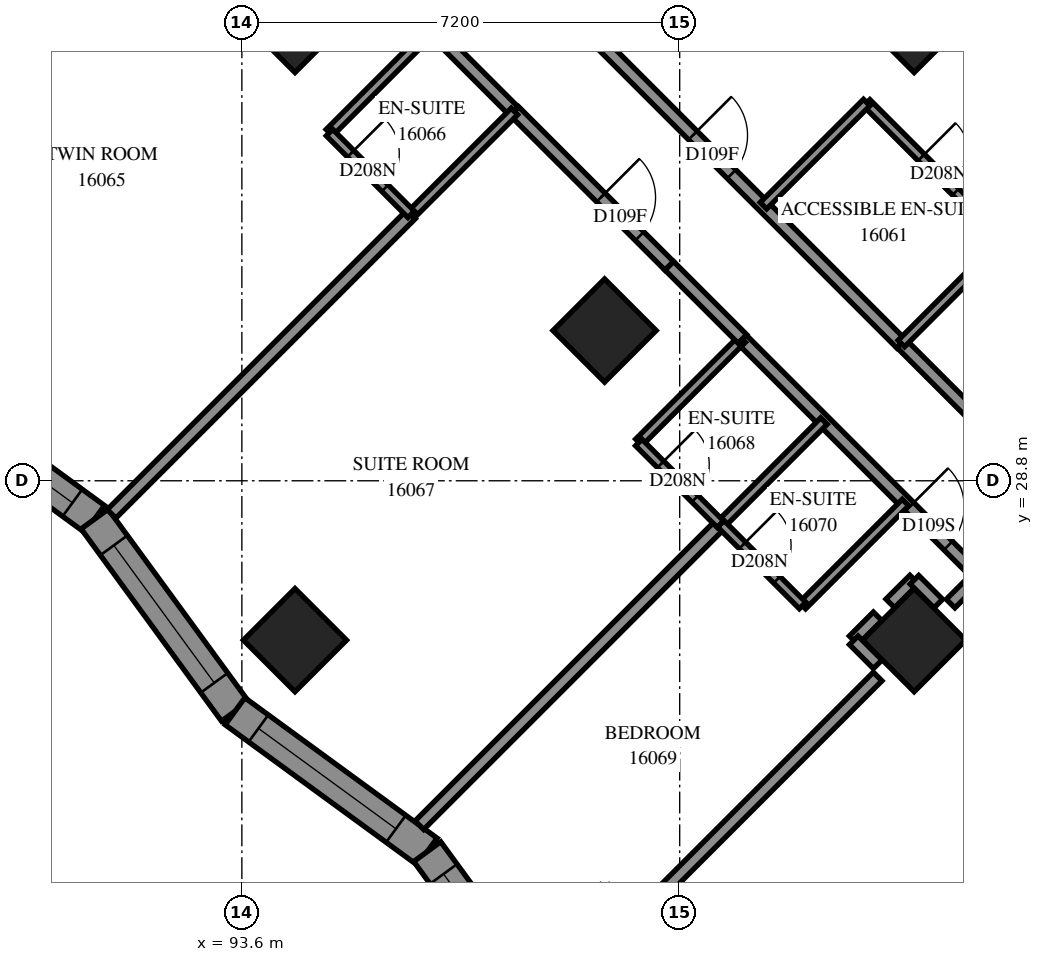
"""IFC4 building model, lengths in metres.
Left out: names, types, materials, properties, quantities, classifications, styles, units other than length and angle.
Written with IfcOpenShell. Run it as: python <this file> out.ifc"""

import sys

from ifc_helpers import new_model, si_unit, direction, frame, frame_2d, origin, origin_2d, place, context, subcontext, project, spatial, polyline, rectangle, outline, extrude, element, fill, save


model = new_model("IFC4")
c1 = context("Model", 3, precision=1e-05, world=origin(), true_north=direction((0.0, 1.0)))
c2 = subcontext(c1, "Body", "Model", "MODEL_VIEW")
j1 = project(units=[si_unit("LENGTHUNIT", "METRE"), si_unit("PLANEANGLEUNIT", "RADIAN")], contexts=[c1])
p1 = place(None, origin())
s1 = spatial("IfcSite", under=j1, at=p1, CompositionType="ELEMENT")
p2 = place(p1, origin())
s2 = spatial("IfcBuilding", under=s1, at=p2, CompositionType="ELEMENT")
p3 = place(p2, frame((0.0, 0.0, 61.0)))
s3 = spatial("IfcBuildingStorey", under=s2, at=p3, CompositionType="ELEMENT", Elevation=61.0)
for number, where, z_axis, x_axis in (
    (1, (94.474, 36.362, 0.0), (0.0, 0.0, 1.0), (0.707, -0.707, 0.0)),
    (2, (104.656, 36.362, 0.0), (0.0, 0.0, 1.0), (0.707, -0.707, 0.0)),
    (3, (99.565, 31.271, 0.0), (0.0, 0.0, 1.0), (0.707, -0.707, 0.0)),
    (4, (94.474, 26.18, 0.0), (0.0, 0.0, 1.0), (0.707, -0.707, 0.0)),
    (5, (104.656, 26.18, 0.0), (0.0, 0.0, 1.0), (0.707, -0.707, 0.0)),
):
    element("IfcColumn", number, at=place(p3, frame(where, z_axis=z_axis, x_axis=x_axis)), inside=s3, PredefinedType="COLUMN", context=c2, shape_type="SweptSolid", body=[
        extrude(rectangle(XDim=1.2, YDim=1.2, at=origin_2d()), origin(), (0.0, 0.0, 1.0), 3.1),
    ])
p4 = place(p3, frame((88.018, 30.479, 0.0), z_axis=(0.0, 0.0, 1.0), x_axis=(0.8076021815, -0.589727663, 0.0)))
e6 = element("IfcWall", 6, at=p4, inside=s3, PredefinedType="SOLIDWALL", context=c2, shape_type="SweptSolid", body=[
    extrude(outline(polyline([(-0.043, -0.275), (3.871, -0.275), (3.957, 0.275), (0.043, 0.275), (-0.043, -0.275)])), origin(), (0.0, 0.0, 1.0), 3.1),
])
p5 = place(p4, frame((0.662, 0.0, 0.5)))
e7 = element("IfcOpeningElement", 7, at=p5, cuts=e6, PredefinedType="OPENING", context=c2, shape_type="SweptSolid", body=[
    extrude(rectangle(XDim=2.8, YDim=2.45, at=frame_2d((1.4, 1.225))), frame((0.0, 0.285, 0.0), z_axis=(0.0, -1.0, 0.0), x_axis=(1.0, 0.0, 0.0)), (0.0, 0.0, 1.0), 0.57),
])
p6 = place(p3, frame((91.179, 28.171, 0.0), z_axis=(0.0, 0.0, 1.0), x_axis=(0.5897321582, -0.807598899, 0.0)))
e8 = element("IfcWall", 8, at=p6, inside=s3, PredefinedType="SOLIDWALL", context=c2, shape_type="SweptSolid", body=[
    extrude(outline(polyline([(0.043, -0.275), (3.957, -0.275), (3.871, 0.275), (-0.043, 0.275), (0.043, -0.275)])), origin(), (0.0, 0.0, 1.0), 3.1),
])
p7 = place(p6, frame((0.536, 0.0, 0.5)))
e9 = element("IfcOpeningElement", 9, at=p7, cuts=e8, PredefinedType="OPENING", context=c2, shape_type="SweptSolid", body=[
    extrude(rectangle(XDim=2.8, YDim=2.45, at=frame_2d((1.4, 1.225))), frame((0.0, 0.285, 0.0), z_axis=(0.0, -1.0, 0.0), x_axis=(1.0, 0.0, 0.0)), (0.0, 0.0, 1.0), 0.57),
])
p8 = place(p3, frame((93.487, 25.009, 0.0), z_axis=(0.0, 0.0, 1.0), x_axis=(0.8076021815, -0.589727663, 0.0)))
e10 = element("IfcWall", 10, at=p8, inside=s3, PredefinedType="SOLIDWALL", context=c2, shape_type="SweptSolid", body=[
    extrude(outline(polyline([(-0.043, -0.275), (3.871, -0.275), (3.957, 0.275), (0.043, 0.275), (-0.043, -0.275)])), origin(), (0.0, 0.0, 1.0), 3.1),
])
p9 = place(p8, frame((0.477, 0.0, 0.5)))
e11 = element("IfcOpeningElement", 11, at=p9, cuts=e10, PredefinedType="OPENING", context=c2, shape_type="SweptSolid", body=[
    extrude(rectangle(XDim=2.8, YDim=2.45, at=frame_2d((1.4, 1.225))), frame((0.0, 0.285, 0.0), z_axis=(0.0, -1.0, 0.0), x_axis=(1.0, 0.0, 0.0)), (0.0, 0.0, 1.0), 0.57),
])
p10 = place(p3, frame((96.648, 22.701, 0.0), z_axis=(0.0, 0.0, 1.0), x_axis=(0.5897321582, -0.807598899, 0.0)))
e12 = element("IfcWall", 12, at=p10, inside=s3, PredefinedType="SOLIDWALL", context=c2, shape_type="SweptSolid", body=[
    extrude(outline(polyline([(0.043, -0.275), (3.957, -0.275), (3.871, 0.275), (-0.043, 0.275), (0.043, -0.275)])), origin(), (0.0, 0.0, 1.0), 3.1),
])
p11 = place(p10, frame((0.455, 0.0, 0.7)))
e13 = element("IfcOpeningElement", 13, at=p11, cuts=e12, PredefinedType="OPENING", context=c2, shape_type="SweptSolid", body=[
    extrude(rectangle(XDim=1.8, YDim=2.2, at=frame_2d((0.9, 1.1))), frame((0.0, 0.285, 0.0), z_axis=(0.0, -1.0, 0.0), x_axis=(1.0, 0.0, 0.0)), (0.0, 0.0, 1.0), 0.57),
])
p12 = place(p3, frame((101.825, 31.125, 0.0), z_axis=(0.0, 0.0, 1.0), x_axis=(0.7071067812, -0.7071067812, 0.0)))
e14 = element("IfcWall", 14, at=p12, inside=s3, PredefinedType="PARTITIONING", context=c2, shape_type="SweptSolid", body=[
    extrude(rectangle(XDim=12.7, YDim=0.2, at=frame_2d((6.35, 0.0))), origin(), (0.0, 0.0, 1.0), 3.1),
])
p13 = place(p12, frame((3.895, 0.0, 0.0)))
e15 = element("IfcOpeningElement", 15, at=p13, cuts=e14, PredefinedType="OPENING", context=c2, shape_type="SweptSolid", body=[
    extrude(rectangle(XDim=0.9, YDim=2.1, at=frame_2d((0.45, 1.05))), frame((0.0, 0.11, 0.0), z_axis=(0.0, -1.0, 0.0), x_axis=(1.0, 0.0, 0.0)), (0.0, 0.0, 1.0), 0.22),
])
p14 = place(p12, frame((9.056, 0.0, 0.0)))
e16 = element("IfcOpeningElement", 16, at=p14, cuts=e14, PredefinedType="OPENING", context=c2, shape_type="SweptSolid", body=[
    extrude(rectangle(XDim=1.0, YDim=2.1, at=frame_2d((0.5, 1.05))), frame((0.0, 0.11, 0.0), z_axis=(0.0, -1.0, 0.0), x_axis=(1.0, 0.0, 0.0)), (0.0, 0.0, 1.0), 0.22),
])
p15 = place(p3, frame((86.311, 33.282, 0.0), z_axis=(0.0, 0.0, 1.0), x_axis=(0.7069956462, 0.7072178987, 0.0)))
e17 = element("IfcWall", 17, at=p15, inside=s3, PredefinedType="PARTITIONING", context=c2, shape_type="SweptSolid", body=[
    extrude(rectangle(XDim=9.449, YDim=0.2, at=frame_2d((4.724, 0.0))), origin(), (0.0, 0.0, 1.0), 3.1),
])
p16 = place(p3, frame((92.349, 40.601, 0.0), z_axis=(0.0, 0.0, 1.0), x_axis=(0.7071067812, -0.7071067812, 0.0)))
e18 = element("IfcWall", 18, at=p16, inside=s3, PredefinedType="PARTITIONING", context=c2, shape_type="SweptSolid", body=[
    extrude(rectangle(XDim=8.101, YDim=0.2, at=frame_2d((4.05, 0.0))), origin(), (0.0, 0.0, 1.0), 3.1),
])
p17 = place(p16, frame((2.909, 0.0, 0.0)))
e19 = element("IfcOpeningElement", 19, at=p17, cuts=e18, PredefinedType="OPENING", context=c2, shape_type="SweptSolid", body=[
    extrude(rectangle(XDim=0.9, YDim=2.1, at=frame_2d((0.45, 1.05))), frame((0.0, 0.11, 0.0), z_axis=(0.0, -1.0, 0.0), x_axis=(1.0, 0.0, 0.0)), (0.0, 0.0, 1.0), 0.22),
])
p18 = place(p3, frame((86.836, 35.372, 0.0), z_axis=(0.0, 0.0, 1.0), x_axis=(0.7071067812, 0.7071067812, 0.0)))
e20 = element("IfcWall", 20, at=p18, inside=s3, PredefinedType="PARTITIONING", context=c2, shape_type="SweptSolid", body=[
    extrude(rectangle(XDim=7.6, YDim=0.2, at=frame_2d((3.8, 0.0))), origin(), (0.0, 0.0, 1.0), 3.1),
])
p19 = place(p18, frame((6.342, 0.0, 0.0)))
e21 = element("IfcOpeningElement", 21, at=p19, cuts=e20, PredefinedType="OPENING", context=c2, shape_type="SweptSolid", body=[
    extrude(rectangle(XDim=1.0, YDim=2.1, at=frame_2d((0.5, 1.05))), frame((0.0, 0.11, 0.0), z_axis=(0.0, -1.0, 0.0), x_axis=(1.0, 0.0, 0.0)), (0.0, 0.0, 1.0), 0.22),
])
p20 = place(p3, frame((99.349, 36.147, 0.0), z_axis=(0.0, 0.0, 1.0), x_axis=(0.7071067812, -0.7071067812, 0.0)))
e22 = element("IfcWall", 22, at=p20, inside=s3, PredefinedType="PARTITIONING", context=c2, shape_type="SweptSolid", body=[
    extrude(rectangle(XDim=7.201, YDim=0.2, at=frame_2d((3.601, 0.0))), origin(), (0.0, 0.0, 1.0), 3.1),
])
p21 = place(p20, frame((2.358, 0.0, 0.0)))
e23 = element("IfcOpeningElement", 23, at=p21, cuts=e22, PredefinedType="OPENING", context=c2, shape_type="SweptSolid", body=[
    extrude(rectangle(XDim=0.9, YDim=2.1, at=frame_2d((0.45, 1.05))), frame((0.0, 0.11, 0.0), z_axis=(0.0, -1.0, 0.0), x_axis=(1.0, 0.0, 0.0)), (0.0, 0.0, 1.0), 0.22),
])
p22 = place(p3, frame((96.519, 23.136, 0.0), z_axis=(0.0, 0.0, 1.0), x_axis=(0.7071067812, 0.7071067812, 0.0)))
e24 = element("IfcWall", 24, at=p22, inside=s3, PredefinedType="PARTITIONING", context=c2, shape_type="SweptSolid", body=[
    extrude(rectangle(XDim=7.005, YDim=0.2, at=frame_2d((3.503, 0.0))), origin(), (0.0, 0.0, 1.0), 3.1),
])
p23 = place(p3, frame((91.457, 28.256, 0.0), z_axis=(0.0, 0.0, 1.0), x_axis=(0.7071067812, 0.7071067812, 0.0)))
e25 = element("IfcWall", 25, at=p23, inside=s3, PredefinedType="PARTITIONING", context=c2, shape_type="SweptSolid", body=[
    extrude(rectangle(XDim=6.964, YDim=0.2, at=frame_2d((3.482, 0.0))), origin(), (0.0, 0.0, 1.0), 3.1),
])
p24 = place(p3, frame((100.163, 21.689, 0.0), z_axis=(0.0, 0.0, 1.0), x_axis=(0.7071067812, 0.7071067812, 0.0)))
e26 = element("IfcWall", 26, at=p24, inside=s3, PredefinedType="PARTITIONING", context=c2, shape_type="SweptSolid", body=[
    extrude(rectangle(XDim=5.504, YDim=0.2, at=frame_2d((2.752, 0.0))), origin(), (0.0, 0.0, 1.0), 3.1),
])
p25 = place(p3, frame((98.082, 34.879, 0.0), z_axis=(0.0, 0.0, 1.0), x_axis=(0.7073845681, -0.7068288851, 0.0)))
e27 = element("IfcWall", 27, at=p25, inside=s3, PredefinedType="PARTITIONING", context=c2, shape_type="SweptSolid", body=[
    extrude(rectangle(XDim=3.599, YDim=0.2, at=frame_2d((1.8, 0.0))), origin(), (0.0, 0.0, 1.0), 3.1),
])
p26 = place(p25, frame((2.009, 0.0, 0.0)))
e28 = element("IfcOpeningElement", 28, at=p26, cuts=e27, PredefinedType="OPENING", context=c2, shape_type="SweptSolid", body=[
    extrude(rectangle(XDim=0.9, YDim=2.1, at=frame_2d((0.45, 1.05))), frame((0.0, 0.11, 0.0), z_axis=(0.0, -1.0, 0.0), x_axis=(1.0, 0.0, 0.0)), (0.0, 0.0, 1.0), 0.22),
])
p27 = place(p3, frame((103.875, 35.015, 0.0), z_axis=(0.0, 0.0, 1.0), x_axis=(0.7071067812, -0.7071067812, 0.0)))
e29 = element("IfcWall", 29, at=p27, inside=s3, PredefinedType="PARTITIONING", context=c2, shape_type="SweptSolid", body=[
    extrude(rectangle(XDim=3.199, YDim=0.15, at=frame_2d((1.599, 0.0))), origin(), (0.0, 0.0, 1.0), 3.1),
])
p28 = place(p27, frame((1.27, 0.0, 0.0)))
e30 = element("IfcOpeningElement", 30, at=p28, cuts=e29, PredefinedType="OPENING", context=c2, shape_type="SweptSolid", body=[
    extrude(rectangle(XDim=0.8, YDim=2.1, at=frame_2d((0.4, 1.05))), frame((0.0, 0.085, 0.0), z_axis=(0.0, -1.0, 0.0), x_axis=(1.0, 0.0, 0.0)), (0.0, 0.0, 1.0), 0.17),
])
p29 = place(p3, frame((104.445, 31.059, 0.0), z_axis=(0.0, 0.0, 1.0), x_axis=(0.7074545101, -0.7067588812, 0.0)))
e31 = element("IfcWall", 31, at=p29, inside=s3, PredefinedType="PARTITIONING", context=c2, shape_type="SweptSolid", body=[
    extrude(rectangle(XDim=2.875, YDim=0.2, at=frame_2d((1.438, 0.0))), origin(), (0.0, 0.0, 1.0), 3.1),
])
p30 = place(p29, frame((1.626, 0.0, 0.0)))
e32 = element("IfcOpeningElement", 32, at=p30, cuts=e31, PredefinedType="OPENING", context=c2, shape_type="SweptSolid", body=[
    extrude(rectangle(XDim=0.9, YDim=2.1, at=frame_2d((0.45, 1.05))), frame((0.0, 0.11, 0.0), z_axis=(0.0, -1.0, 0.0), x_axis=(1.0, 0.0, 0.0)), (0.0, 0.0, 1.0), 0.22),
])
p31 = place(p3, frame((100.129, 29.433, 0.0), z_axis=(0.0, 0.0, 1.0), x_axis=(0.7071067812, 0.7071067812, 0.0)))
e33 = element("IfcWall", 33, at=p31, inside=s3, PredefinedType="PARTITIONING", context=c2, shape_type="SweptSolid", body=[
    extrude(rectangle(XDim=2.401, YDim=0.15, at=frame_2d((1.201, 0.0))), origin(), (0.0, 0.0, 1.0), 3.1),
])
for number, where, z_axis, x_axis in (
    (34, (96.384, 33.178, 0.0), (0.0, 0.0, 1.0), (0.708, 0.707, 0.0)),
    (35, (104.445, 31.057, 0.0), (0.0, 0.0, 1.0), (0.707, 0.708, 0.0)),
    (36, (101.477, 28.085, 0.0), (0.0, 0.0, 1.0), (0.707, 0.708, 0.0)),
    (37, (102.177, 33.325, 0.0), (0.0, 0.0, 1.0), (0.708, 0.707, 0.0)),
):
    element("IfcWall", number, at=place(p3, frame(where, z_axis=z_axis, x_axis=x_axis)), inside=s3, PredefinedType="PARTITIONING", context=c2, shape_type="SweptSolid", body=[
        extrude(rectangle(XDim=2.4, YDim=0.15, at=frame_2d((1.2, 0.0))), origin(), (0.0, 0.0, 1.0), 3.1),
    ])
for number, where, z_axis, x_axis in (
    (38, (95.039, 34.525, 0.0), (0.0, 0.0, 1.0), (0.707, 0.707, 0.0)),
    (39, (102.817, 26.747, 0.0), (0.0, 0.0, 1.0), (0.707, 0.707, 0.0)),
):
    element("IfcWall", number, at=place(p3, frame(where, z_axis=z_axis, x_axis=x_axis)), inside=s3, PredefinedType="PARTITIONING", context=c2, shape_type="SweptSolid", body=[
        extrude(rectangle(XDim=2.398, YDim=0.15, at=frame_2d((1.199, 0.0))), origin(), (0.0, 0.0, 1.0), 3.1),
    ])
p32 = place(p3, frame((100.127, 29.429, 0.0), z_axis=(0.0, 0.0, 1.0), x_axis=(0.7071067812, -0.7071067812, 0.0)))
e40 = element("IfcWall", 40, at=p32, inside=s3, PredefinedType="PARTITIONING", context=c2, shape_type="SweptSolid", body=[
    extrude(rectangle(XDim=1.901, YDim=0.15, at=frame_2d((0.95, 0.0))), origin(), (0.0, 0.0, 1.0), 3.1),
])
p33 = place(p32, frame((0.508, 0.0, 0.0)))
e41 = element("IfcOpeningElement", 41, at=p33, cuts=e40, PredefinedType="OPENING", context=c2, shape_type="SweptSolid", body=[
    extrude(rectangle(XDim=0.8, YDim=2.1, at=frame_2d((0.4, 1.05))), frame((0.0, 0.085, 0.0), z_axis=(0.0, -1.0, 0.0), x_axis=(1.0, 0.0, 0.0)), (0.0, 0.0, 1.0), 0.17),
])
p34 = place(p3, frame((95.042, 34.526, 0.0), z_axis=(0.0, 0.0, 1.0), x_axis=(0.7065800724, -0.7076330979, 0.0)))
e42 = element("IfcWall", 42, at=p34, inside=s3, PredefinedType="PARTITIONING", context=c2, shape_type="SweptSolid", body=[
    extrude(rectangle(XDim=1.899, YDim=0.15, at=frame_2d((0.95, 0.0))), origin(), (0.0, 0.0, 1.0), 3.1),
])
p35 = place(p34, frame((0.491, 0.0, 0.0)))
e43 = element("IfcOpeningElement", 43, at=p35, cuts=e42, PredefinedType="OPENING", context=c2, shape_type="SweptSolid", body=[
    extrude(rectangle(XDim=0.8, YDim=2.1, at=frame_2d((0.4, 1.05))), frame((0.0, 0.085, 0.0), z_axis=(0.0, -1.0, 0.0), x_axis=(1.0, 0.0, 0.0)), (0.0, 0.0, 1.0), 0.17),
])
p36 = place(p3, frame((101.477, 28.091, 0.0), z_axis=(0.0, 0.0, 1.0), x_axis=(0.7076330979, -0.7065800724, 0.0)))
e44 = element("IfcWall", 44, at=p36, inside=s3, PredefinedType="PARTITIONING", context=c2, shape_type="SweptSolid", body=[
    extrude(rectangle(XDim=1.899, YDim=0.15, at=frame_2d((0.95, 0.0))), origin(), (0.0, 0.0, 1.0), 3.1),
])
p37 = place(p36, frame((0.501, 0.0, 0.0)))
e45 = element("IfcOpeningElement", 45, at=p37, cuts=e44, PredefinedType="OPENING", context=c2, shape_type="SweptSolid", body=[
    extrude(rectangle(XDim=0.8, YDim=2.1, at=frame_2d((0.4, 1.05))), frame((0.0, 0.085, 0.0), z_axis=(0.0, -1.0, 0.0), x_axis=(1.0, 0.0, 0.0)), (0.0, 0.0, 1.0), 0.17),
])
p38 = place(p3, frame((100.629, 32.335, 0.0), z_axis=(0.0, 0.0, 1.0), x_axis=(0.7071067812, -0.7071067812, 0.0)))
e46 = element("IfcWall", 46, at=p38, inside=s3, PredefinedType="PARTITIONING", context=c2, shape_type="SweptSolid", body=[
    extrude(rectangle(XDim=1.7, YDim=0.2, at=frame_2d((0.85, 0.0))), origin(), (0.0, 0.0, 1.0), 3.1),
])
p39 = place(p3, frame((105.255, 26.781, 0.0), z_axis=(0.0, 0.0, 1.0), x_axis=(0.7071067812, 0.7071067812, 0.0)))
e47 = element("IfcWall", 47, at=p39, inside=s3, PredefinedType="PARTITIONING", context=c2, shape_type="SweptSolid", body=[
    extrude(rectangle(XDim=0.65, YDim=0.2, at=frame_2d((0.325, 0.0))), origin(), (0.0, 0.0, 1.0), 3.1),
])
for number, where, z_axis, x_axis in (
    (48, (103.661, 26.177, 0.0), (0.0, 0.0, 1.0), (0.707, 0.707, 0.0)),
    (49, (103.662, 26.177, 0.0), (0.0, 0.0, 1.0), (0.707, -0.707, 0.0)),
):
    element("IfcWall", number, at=place(p3, frame(where, z_axis=z_axis, x_axis=x_axis)), inside=s3, PredefinedType="PARTITIONING", context=c2, shape_type="SweptSolid", body=[
        extrude(rectangle(XDim=0.557, YDim=0.2, at=frame_2d((0.279, 0.0))), origin(), (0.0, 0.0, 1.0), 3.1),
    ])
p40 = place(p3, frame((104.263, 26.784, 0.0), z_axis=(0.0, 0.0, 1.0), x_axis=(0.7089037401, 0.705305244, 0.0)))
e50 = element("IfcWall", 50, at=p40, inside=s3, PredefinedType="PARTITIONING", context=c2, shape_type="SweptSolid", body=[
    extrude(rectangle(XDim=0.556, YDim=0.2, at=frame_2d((0.278, 0.0))), origin(), (0.0, 0.0, 1.0), 3.1),
])
p41 = place(p3, frame((104.66, 27.172, 0.0), z_axis=(0.0, 0.0, 1.0), x_axis=(0.7071067812, -0.7071067812, 0.0)))
e51 = element("IfcWall", 51, at=p41, inside=s3, PredefinedType="PARTITIONING", context=c2, shape_type="SweptSolid", body=[
    extrude(rectangle(XDim=0.554, YDim=0.2, at=frame_2d((0.277, 0.0))), origin(), (0.0, 0.0, 1.0), 3.1),
])
p42 = place(p5, origin())
e52 = element("IfcWindow", 52, at=p42, inside=s3, PartitioningType="SINGLE_PANEL", PredefinedType="WINDOW", context=c2, shape_type="SweptSolid", body=[
    extrude(rectangle(XDim=2.8, YDim=2.45, at=frame_2d((1.4, 1.225))), frame((0.0, 0.155, 0.0), z_axis=(0.0, -1.0, 0.0), x_axis=(1.0, 0.0, 0.0)), (0.0, 0.0, 1.0), 0.06),
])
fill(e7, e52)
p43 = place(p7, origin())
e53 = element("IfcWindow", 53, at=p43, inside=s3, PartitioningType="SINGLE_PANEL", PredefinedType="WINDOW", context=c2, shape_type="SweptSolid", body=[
    extrude(rectangle(XDim=2.8, YDim=2.45, at=frame_2d((1.4, 1.225))), frame((0.0, 0.155, 0.0), z_axis=(0.0, -1.0, 0.0), x_axis=(1.0, 0.0, 0.0)), (0.0, 0.0, 1.0), 0.06),
])
fill(e9, e53)
p44 = place(p9, origin())
e54 = element("IfcWindow", 54, at=p44, inside=s3, PartitioningType="SINGLE_PANEL", PredefinedType="WINDOW", context=c2, shape_type="SweptSolid", body=[
    extrude(rectangle(XDim=2.8, YDim=2.45, at=frame_2d((1.4, 1.225))), frame((0.0, 0.155, 0.0), z_axis=(0.0, -1.0, 0.0), x_axis=(1.0, 0.0, 0.0)), (0.0, 0.0, 1.0), 0.06),
])
fill(e11, e54)
p45 = place(p21, origin())
e55 = element("IfcDoor", 55, at=p45, inside=s3, OperationType="SINGLE_SWING_RIGHT", PredefinedType="DOOR", context=c2, shape_type="SweptSolid", body=[
    extrude(rectangle(XDim=0.9, YDim=2.1, at=frame_2d((0.45, 1.05))), frame((0.0, 0.025, 0.0), z_axis=(0.0, -1.0, 0.0), x_axis=(1.0, 0.0, 0.0)), (0.0, 0.0, 1.0), 0.05),
])
fill(e23, e55)
p46 = place(p28, origin())
e56 = element("IfcDoor", 56, at=p46, inside=s3, OperationType="SINGLE_SWING_RIGHT", PredefinedType="DOOR", context=c2, shape_type="SweptSolid", body=[
    extrude(rectangle(XDim=0.8, YDim=2.1, at=frame_2d((0.4, 1.05))), frame((0.0, 0.025, 0.0), z_axis=(0.0, -1.0, 0.0), x_axis=(1.0, 0.0, 0.0)), (0.0, 0.0, 1.0), 0.05),
])
fill(e30, e56)
p47 = place(p35, origin())
e57 = element("IfcDoor", 57, at=p47, inside=s3, OperationType="SINGLE_SWING_RIGHT", PredefinedType="DOOR", context=c2, shape_type="SweptSolid", body=[
    extrude(rectangle(XDim=0.8, YDim=2.1, at=frame_2d((0.4, 1.05))), frame((0.0, 0.025, 0.0), z_axis=(0.0, -1.0, 0.0), x_axis=(1.0, 0.0, 0.0)), (0.0, 0.0, 1.0), 0.05),
])
fill(e43, e57)
p48 = place(p26, origin())
e58 = element("IfcDoor", 58, at=p48, inside=s3, OperationType="SINGLE_SWING_LEFT", PredefinedType="DOOR", context=c2, shape_type="SweptSolid", body=[
    extrude(rectangle(XDim=0.9, YDim=2.1, at=frame_2d((0.45, 1.05))), frame((0.0, 0.025, 0.0), z_axis=(0.0, -1.0, 0.0), x_axis=(1.0, 0.0, 0.0)), (0.0, 0.0, 1.0), 0.05),
])
fill(e28, e58)
p49 = place(p33, origin())
e59 = element("IfcDoor", 59, at=p49, inside=s3, OperationType="SINGLE_SWING_RIGHT", PredefinedType="DOOR", context=c2, shape_type="SweptSolid", body=[
    extrude(rectangle(XDim=0.8, YDim=2.1, at=frame_2d((0.4, 1.05))), frame((0.0, 0.025, 0.0), z_axis=(0.0, -1.0, 0.0), x_axis=(1.0, 0.0, 0.0)), (0.0, 0.0, 1.0), 0.05),
])
fill(e41, e59)
p50 = place(p13, origin())
e60 = element("IfcDoor", 60, at=p50, inside=s3, OperationType="SINGLE_SWING_LEFT", PredefinedType="DOOR", context=c2, shape_type="SweptSolid", body=[
    extrude(rectangle(XDim=0.9, YDim=2.1, at=frame_2d((0.45, 1.05))), frame((0.0, 0.025, 0.0), z_axis=(0.0, -1.0, 0.0), x_axis=(1.0, 0.0, 0.0)), (0.0, 0.0, 1.0), 0.05),
])
fill(e15, e60)
p51 = place(p37, origin())
e61 = element("IfcDoor", 61, at=p51, inside=s3, OperationType="SINGLE_SWING_RIGHT", PredefinedType="DOOR", context=c2, shape_type="SweptSolid", body=[
    extrude(rectangle(XDim=0.8, YDim=2.1, at=frame_2d((0.4, 1.05))), frame((0.0, 0.025, 0.0), z_axis=(0.0, -1.0, 0.0), x_axis=(1.0, 0.0, 0.0)), (0.0, 0.0, 1.0), 0.05),
])
fill(e45, e61)
p52 = place(p11, origin())
e62 = element("IfcWindow", 62, at=p52, inside=s3, PartitioningType="SINGLE_PANEL", PredefinedType="WINDOW", context=c2, shape_type="SweptSolid", body=[
    extrude(rectangle(XDim=1.8, YDim=2.2, at=frame_2d((0.9, 1.1))), frame((0.0, 0.155, 0.0), z_axis=(0.0, -1.0, 0.0), x_axis=(1.0, 0.0, 0.0)), (0.0, 0.0, 1.0), 0.06),
])
fill(e13, e62)
save(model, sys.argv[1])
